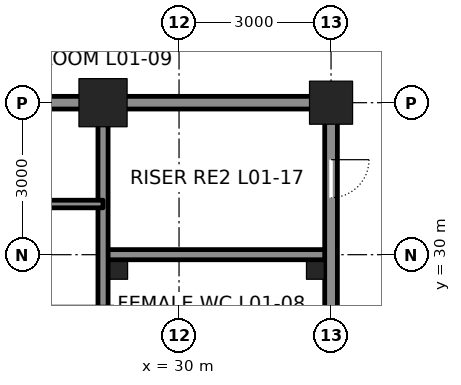
"""IFC4 building model, lengths in metres.
Left out: names, types, materials, properties, quantities, classifications, styles, units other than length and angle.
Written with IfcOpenShell. Run it as: python <this file> out.ifc"""

import sys

from ifc_helpers import new_model, si_unit, direction, frame, frame_2d, origin, origin_2d, place, context, subcontext, project, spatial, rectangle, hollow_rectangle, extrude, element, fill, save


model = new_model("IFC4")
c1 = context("Model", 3, precision=1e-05, world=origin(), true_north=direction((0.0, 1.0)))
c2 = subcontext(c1, "Body", "Model", "MODEL_VIEW")
j1 = project(units=[si_unit("LENGTHUNIT", "METRE"), si_unit("PLANEANGLEUNIT", "RADIAN")], contexts=[c1])
p1 = place(None, origin())
s1 = spatial("IfcSite", under=j1, at=p1, CompositionType="ELEMENT")
p2 = place(p1, origin())
s2 = spatial("IfcBuilding", under=s1, at=p2, CompositionType="ELEMENT")
p3 = place(p2, frame((0.0, 0.0, 6.0)))
s3 = spatial("IfcBuildingStorey", under=s2, at=p3, CompositionType="ELEMENT", Elevation=6.0)
p4 = place(p3, frame((28.5, 33.0, 0.0), z_axis=(0.0, 0.0, 1.0), x_axis=(1.0, 0.0, 0.0)))
e1 = element("IfcColumn", 1, at=p4, inside=s3, PredefinedType="COLUMN", context=c2, shape_type="SweptSolid", body=[
    extrude(hollow_rectangle(XDim=0.95, YDim=0.95, WallThickness=0.095, at=origin_2d()), origin(), (0.0, 0.0, 1.0), 7.5),
])
p5 = place(p3, frame((33.0, 33.0, 0.0), z_axis=(0.0, 0.0, 1.0), x_axis=(1.0, 0.0, 0.0)))
e2 = element("IfcColumn", 2, at=p5, inside=s3, PredefinedType="COLUMN", context=c2, shape_type="SweptSolid", body=[
    extrude(hollow_rectangle(XDim=0.85, YDim=0.85, WallThickness=0.085, at=origin_2d()), origin(), (0.0, 0.0, 1.0), 7.5),
])
p6 = place(p3, frame((28.5, 30.0, 0.0), z_axis=(0.0, 0.0, 1.0), x_axis=(1.0, 0.0, 0.0)))
e3 = element("IfcWall", 3, at=p6, inside=s3, PredefinedType="SOLIDWALL", context=c2, shape_type="SweptSolid", body=[
    extrude(rectangle(XDim=4.5, YDim=0.2, at=frame_2d((2.25, 0.0))), origin(), (0.0, 0.0, 1.0), 7.3),
])
p7 = place(p3, frame((25.75, 33.0, 0.0), z_axis=(0.0, 0.0, 1.0), x_axis=(1.0, 0.0, 0.0)))
e4 = element("IfcWall", 4, at=p7, inside=s3, PredefinedType="SOLIDWALL", context=c2, shape_type="SweptSolid", body=[
    extrude(rectangle(XDim=2.5, YDim=0.25, at=frame_2d((1.25, 0.0))), origin(), (0.0, 0.0, 1.0), 6.441),
])
p8 = place(p3, frame((28.75, 33.0, 0.0), z_axis=(0.0, 0.0, 1.0), x_axis=(1.0, 0.0, 0.0)))
e5 = element("IfcWall", 5, at=p8, inside=s3, PredefinedType="SOLIDWALL", context=c2, shape_type="SweptSolid", body=[
    extrude(rectangle(XDim=4.0, YDim=0.25, at=frame_2d((2.0, 0.0))), origin(), (0.0, 0.0, 1.0), 6.441),
])
p9 = place(p3, frame((28.5, 24.25, 0.0), z_axis=(0.0, 0.0, 1.0), x_axis=(0.0, 1.0, 0.0)))
e6 = element("IfcWall", 6, at=p9, inside=s3, PredefinedType="SOLIDWALL", context=c2, shape_type="SweptSolid", body=[
    extrude(rectangle(XDim=8.5, YDim=0.2, at=frame_2d((4.25, 0.0))), origin(), (0.0, 0.0, 1.0), 6.373),
])
p10 = place(p3, frame((33.0, 24.25, 0.0), z_axis=(0.0, 0.0, 1.0), x_axis=(0.0, 1.0, 0.0)))
e7 = element("IfcWall", 7, at=p10, inside=s3, PredefinedType="SOLIDWALL", context=c2, shape_type="SweptSolid", body=[
    extrude(rectangle(XDim=8.5, YDim=0.25, at=frame_2d((4.25, 0.0))), origin(), (0.0, 0.0, 1.0), 6.373),
])
p11 = place(p10, frame((6.875, 0.0, 0.0)))
e8 = element("IfcOpeningElement", 8, at=p11, cuts=e7, PredefinedType="OPENING", context=c2, shape_type="SweptSolid", body=[
    extrude(rectangle(XDim=0.75, YDim=2.1, at=frame_2d((0.375, 1.05))), frame((0.0, 0.135, 0.0), z_axis=(0.0, -1.0, 0.0), x_axis=(1.0, 0.0, 0.0)), (0.0, 0.0, 1.0), 0.27),
])
p12 = place(p3, frame((25.5, 31.0, 0.0), z_axis=(0.0, 0.0, 1.0), x_axis=(1.0, 0.0, 0.0)))
e9 = element("IfcWall", 9, at=p12, inside=s3, PredefinedType="PARTITIONING", context=c2, shape_type="SweptSolid", body=[
    extrude(rectangle(XDim=3.0, YDim=0.15, at=frame_2d((1.5, 0.0))), origin(), (0.0, 0.0, 1.0), 7.3),
])
for number, where, z_axis, x_axis in (
    (10, (28.81, 29.69, 0.0), (0.0, 0.0, 1.0), (1.0, 0.0, 0.0)),
    (11, (32.69, 29.69, 0.0), (0.0, 0.0, 1.0), (1.0, 0.0, 0.0)),
):
    element("IfcColumn", number, at=place(p3, frame(where, z_axis=z_axis, x_axis=x_axis)), inside=s3, PredefinedType="COLUMN", context=c2, shape_type="SweptSolid", body=[
        extrude(hollow_rectangle(XDim=0.35, YDim=0.35, WallThickness=0.035, at=origin_2d()), origin(), (0.0, 0.0, 1.0), 7.5),
    ])
p13 = place(p11, frame((0.75, 0.0, 0.0), z_axis=(0.0, 0.0, 1.0), x_axis=(-1.0, 0.0, 0.0)))
e12 = element("IfcDoor", 12, at=p13, inside=s3, OperationType="SINGLE_SWING_LEFT", PredefinedType="DOOR", context=c2, shape_type="SweptSolid", body=[
    extrude(rectangle(XDim=0.75, YDim=2.1, at=frame_2d((0.375, 1.05))), frame((0.0, 0.025, 0.0), z_axis=(0.0, -1.0, 0.0), x_axis=(1.0, 0.0, 0.0)), (0.0, 0.0, 1.0), 0.05),
])
fill(e8, e12)
save(model, sys.argv[1])
